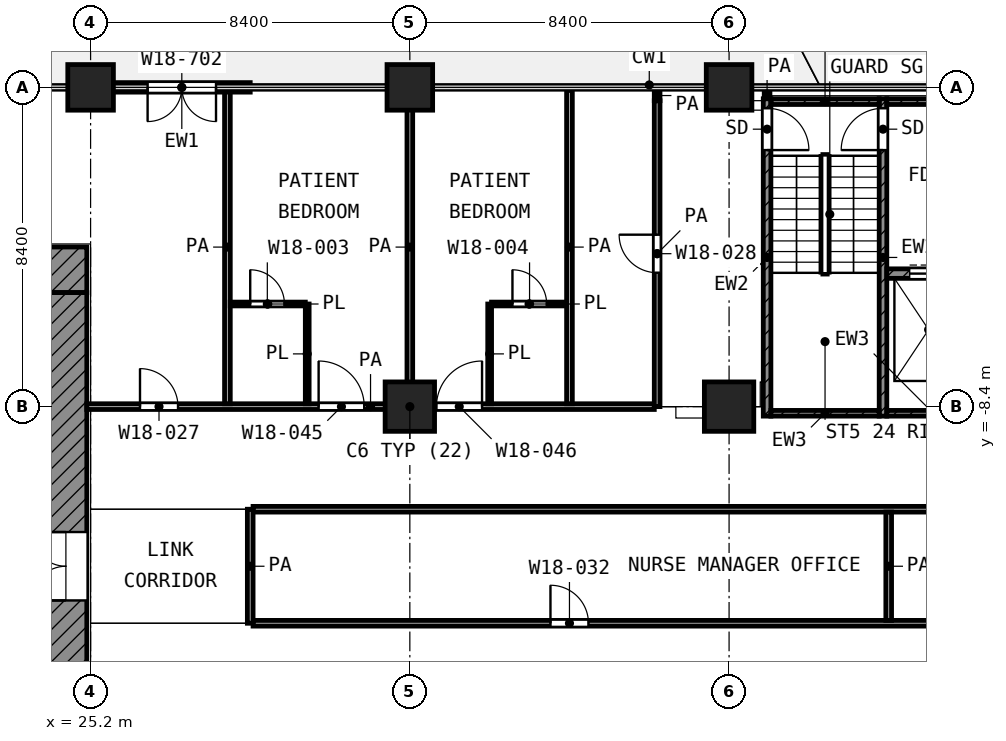
"""IFC4 building model, lengths in metres.
Left out: names, types, materials, properties, quantities, classifications, styles, units other than length and angle.
Written with IfcOpenShell. Run it as: python <this file> out.ifc"""

import sys

from ifc_helpers import new_model, si_unit, direction, frame, frame_2d, origin, origin_2d, place, context, subcontext, project, spatial, rectangle, extrude, element, fill, save


model = new_model("IFC4")
c1 = context("Model", 3, precision=1e-05, world=origin(), true_north=direction((0.0, 1.0)))
c2 = subcontext(c1, "Body", "Model", "MODEL_VIEW")
j1 = project(units=[si_unit("LENGTHUNIT", "METRE"), si_unit("PLANEANGLEUNIT", "RADIAN")], contexts=[c1])
p1 = place(None, origin())
s1 = spatial("IfcSite", under=j1, at=p1, CompositionType="ELEMENT")
p2 = place(p1, origin())
s2 = spatial("IfcBuilding", under=s1, at=p2, CompositionType="ELEMENT")
p3 = place(p2, frame((0.0, 0.0, 81.2)))
s3 = spatial("IfcBuildingStorey", under=s2, at=p3, CompositionType="ELEMENT", Elevation=81.2)
for number, where, z_axis, x_axis in (
    (1, (25.2, 0.0, 0.0), (0.0, 0.0, 1.0), (1.0, 0.0, 0.0)),
    (2, (33.6, 0.0, 0.0), (0.0, 0.0, 1.0), (1.0, 0.0, 0.0)),
    (3, (42.0, 0.0, 0.0), (0.0, 0.0, 1.0), (1.0, 0.0, 0.0)),
):
    element("IfcColumn", number, at=place(p3, frame(where, z_axis=z_axis, x_axis=x_axis)), inside=s3, PredefinedType="COLUMN", context=c2, shape_type="SweptSolid", body=[
        extrude(rectangle(XDim=1.2, YDim=1.2, at=origin_2d()), origin(), (0.0, 0.0, 1.0), 4.2),
    ])
for number, where, z_axis, x_axis in (
    (4, (33.6, -8.4, 0.0), (0.0, 0.0, 1.0), (1.0, 0.0, 0.0)),
    (5, (42.0, -8.4, 0.0), (0.0, 0.0, 1.0), (1.0, 0.0, 0.0)),
):
    element("IfcColumn", number, at=place(p3, frame(where, z_axis=z_axis, x_axis=x_axis)), inside=s3, PredefinedType="COLUMN", context=c2, shape_type="SweptSolid", body=[
        extrude(rectangle(XDim=1.3, YDim=1.3, at=origin_2d()), origin(), (0.0, 0.0, 1.0), 4.2),
    ])
p4 = place(p3, frame((29.4, 0.0, 0.0), z_axis=(0.0, 0.0, 1.0), x_axis=(-1.0, 0.0, 0.0)))
e6 = element("IfcWall", 6, at=p4, inside=s3, PredefinedType="SOLIDWALL", context=c2, shape_type="SweptSolid", body=[
    extrude(rectangle(XDim=3.6, YDim=0.25, at=frame_2d((1.8, 0.0))), origin(), (0.0, 0.0, 1.0), 3.78),
])
p5 = place(p4, frame((0.9, 0.0, 0.0)))
e7 = element("IfcOpeningElement", 7, at=p5, cuts=e6, PredefinedType="OPENING", context=c2, shape_type="SweptSolid", body=[
    extrude(rectangle(XDim=1.8, YDim=2.1, at=frame_2d((0.9, 1.05))), frame((0.0, 0.135, 0.0), z_axis=(0.0, -1.0, 0.0), x_axis=(1.0, 0.0, 0.0)), (0.0, 0.0, 1.0), 0.27),
])
p6 = place(p3, frame((4.2, -4.8, 0.0), z_axis=(0.0, 0.0, 1.0), x_axis=(1.0, 0.0, 0.0)))
e8 = element("IfcWall", 8, at=p6, inside=s3, PredefinedType="SHEAR", context=c2, shape_type="SweptSolid", body=[
    extrude(rectangle(XDim=20.9, YDim=1.2, at=frame_2d((10.45, 0.0))), origin(), (0.0, 0.0, 1.0), 3.9),
])
p7 = place(p6, frame((1.95, 0.0, 0.0)))
e9 = element("IfcOpeningElement", 9, at=p7, cuts=e8, PredefinedType="OPENING", context=c2, shape_type="SweptSolid", body=[
    extrude(rectangle(XDim=1.1, YDim=2.1, at=frame_2d((0.55, 1.05))), frame((0.0, 0.61, 0.0), z_axis=(0.0, -1.0, 0.0), x_axis=(1.0, 0.0, 0.0)), (0.0, 0.0, 1.0), 1.22),
])
p8 = place(p6, frame((17.95, 0.0, 0.0)))
e10 = element("IfcOpeningElement", 10, at=p8, cuts=e8, PredefinedType="OPENING", context=c2, shape_type="SweptSolid", body=[
    extrude(rectangle(XDim=1.1, YDim=2.1, at=frame_2d((0.55, 1.05))), frame((0.0, 0.61, 0.0), z_axis=(0.0, -1.0, 0.0), x_axis=(1.0, 0.0, 0.0)), (0.0, 0.0, 1.0), 1.22),
])
p9 = place(p3, frame((24.55, -24.0, 0.0), z_axis=(0.0, 0.0, 1.0), x_axis=(0.0, 1.0, 0.0)))
e11 = element("IfcWall", 11, at=p9, inside=s3, PredefinedType="SHEAR", context=c2, shape_type="SweptSolid", body=[
    extrude(rectangle(XDim=18.6, YDim=1.1, at=frame_2d((9.3, 0.0))), origin(), (0.0, 0.0, 1.0), 3.9),
])
p10 = place(p9, frame((10.5, 0.0, 0.0)))
e12 = element("IfcOpeningElement", 12, at=p10, cuts=e11, PredefinedType="OPENING", context=c2, shape_type="SweptSolid", body=[
    extrude(rectangle(XDim=1.8, YDim=2.1, at=frame_2d((0.9, 1.05))), frame((0.0, 0.56, 0.0), z_axis=(0.0, -1.0, 0.0), x_axis=(1.0, 0.0, 0.0)), (0.0, 0.0, 1.0), 1.12),
])
p11 = place(p3, frame((43.0, -8.65, 0.0), z_axis=(0.0, 0.0, 1.0), x_axis=(0.0, 1.0, 0.0)))
e13 = element("IfcWall", 13, at=p11, inside=s3, PredefinedType="SHEAR", context=c2, shape_type="SweptSolid", body=[
    extrude(rectangle(XDim=8.35, YDim=0.2, at=frame_2d((4.175, 0.0))), origin(), (0.0, 0.0, 1.0), 3.9),
])
p12 = place(p11, frame((7.0, 0.0, 0.0)))
e14 = element("IfcOpeningElement", 14, at=p12, cuts=e13, PredefinedType="OPENING", context=c2, shape_type="SweptSolid", body=[
    extrude(rectangle(XDim=1.1, YDim=2.1, at=frame_2d((0.55, 1.05))), frame((0.0, 0.11, 0.0), z_axis=(0.0, -1.0, 0.0), x_axis=(1.0, 0.0, 0.0)), (0.0, 0.0, 1.0), 0.22),
])
p13 = place(p3, frame((46.05, -8.65, 0.0), z_axis=(0.0, 0.0, 1.0), x_axis=(0.0, 1.0, 0.0)))
e15 = element("IfcWall", 15, at=p13, inside=s3, PredefinedType="SHEAR", context=c2, shape_type="SweptSolid", body=[
    extrude(rectangle(XDim=8.35, YDim=0.2, at=frame_2d((4.175, 0.0))), origin(), (0.0, 0.0, 1.0), 3.9),
])
p14 = place(p13, frame((7.0, 0.0, 0.0)))
e16 = element("IfcOpeningElement", 16, at=p14, cuts=e15, PredefinedType="OPENING", context=c2, shape_type="SweptSolid", body=[
    extrude(rectangle(XDim=1.1, YDim=2.1, at=frame_2d((0.55, 1.05))), frame((0.0, 0.11, 0.0), z_axis=(0.0, -1.0, 0.0), x_axis=(1.0, 0.0, 0.0)), (0.0, 0.0, 1.0), 0.22),
])
p15 = place(p3, frame((43.1, -0.375, 0.0), z_axis=(0.0, 0.0, 1.0), x_axis=(1.0, 0.0, 0.0)))
e17 = element("IfcWall", 17, at=p15, inside=s3, PredefinedType="SHEAR", context=c2, shape_type="SweptSolid", body=[
    extrude(rectangle(XDim=2.85, YDim=0.15, at=frame_2d((1.425, 0.0))), origin(), (0.0, 0.0, 1.0), 3.9),
])
p16 = place(p3, frame((46.15, -0.375, 0.0), z_axis=(0.0, 0.0, 1.0), x_axis=(1.0, 0.0, 0.0)))
e18 = element("IfcWall", 18, at=p16, inside=s3, PredefinedType="SHEAR", context=c2, shape_type="SweptSolid", body=[
    extrude(rectangle(XDim=2.45, YDim=0.15, at=frame_2d((1.225, 0.0))), origin(), (0.0, 0.0, 1.0), 3.9),
])
p17 = place(p3, frame((43.1, -8.575, 0.0), z_axis=(0.0, 0.0, 1.0), x_axis=(1.0, 0.0, 0.0)))
e19 = element("IfcWall", 19, at=p17, inside=s3, PredefinedType="SHEAR", context=c2, shape_type="SweptSolid", body=[
    extrude(rectangle(XDim=2.85, YDim=0.15, at=frame_2d((1.425, 0.0))), origin(), (0.0, 0.0, 1.0), 3.9),
])
p18 = place(p3, frame((46.15, -8.575, 0.0), z_axis=(0.0, 0.0, 1.0), x_axis=(1.0, 0.0, 0.0)))
e20 = element("IfcWall", 20, at=p18, inside=s3, PredefinedType="SHEAR", context=c2, shape_type="SweptSolid", body=[
    extrude(rectangle(XDim=2.45, YDim=0.15, at=frame_2d((1.225, 0.0))), origin(), (0.0, 0.0, 1.0), 3.9),
])
p19 = place(p3, frame((46.15, -4.9, 0.0), z_axis=(0.0, 0.0, 1.0), x_axis=(1.0, 0.0, 0.0)))
e21 = element("IfcWall", 21, at=p19, inside=s3, PredefinedType="SHEAR", context=c2, shape_type="SweptSolid", body=[
    extrude(rectangle(XDim=2.45, YDim=0.25, at=frame_2d((1.225, 0.0))), origin(), (0.0, 0.0, 1.0), 3.9),
])
p20 = place(p19, frame((0.6, 0.0, 0.0)))
e22 = element("IfcOpeningElement", 22, at=p20, cuts=e21, PredefinedType="OPENING", context=c2, shape_type="SweptSolid", body=[
    extrude(rectangle(XDim=1.3, YDim=2.1, at=frame_2d((0.65, 1.05))), frame((0.0, 0.135, 0.0), z_axis=(0.0, -1.0, 0.0), x_axis=(1.0, 0.0, 0.0)), (0.0, 0.0, 1.0), 0.27),
])
p21 = place(p3, frame((28.875, -5.7, 0.0), z_axis=(0.0, 0.0, 1.0), x_axis=(1.0, 0.0, 0.0)))
e23 = element("IfcWall", 23, at=p21, inside=s3, PredefinedType="PARTITIONING", context=c2, shape_type="SweptSolid", body=[
    extrude(rectangle(XDim=1.975, YDim=0.1, at=frame_2d((0.988, 0.0))), origin(), (0.0, 0.0, 1.0), 3.9),
])
p22 = place(p21, frame((0.525, 0.0, 0.0)))
e24 = element("IfcOpeningElement", 24, at=p22, cuts=e23, PredefinedType="OPENING", context=c2, shape_type="SweptSolid", body=[
    extrude(rectangle(XDim=0.9, YDim=2.1, at=frame_2d((0.45, 1.05))), frame((0.0, 0.06, 0.0), z_axis=(0.0, -1.0, 0.0), x_axis=(1.0, 0.0, 0.0)), (0.0, 0.0, 1.0), 0.12),
])
p23 = place(p3, frame((35.75, -5.7, 0.0), z_axis=(0.0, 0.0, 1.0), x_axis=(1.0, 0.0, 0.0)))
e25 = element("IfcWall", 25, at=p23, inside=s3, PredefinedType="PARTITIONING", context=c2, shape_type="SweptSolid", body=[
    extrude(rectangle(XDim=1.975, YDim=0.1, at=frame_2d((0.988, 0.0))), origin(), (0.0, 0.0, 1.0), 3.9),
])
p24 = place(p23, frame((0.55, 0.0, 0.0)))
e26 = element("IfcOpeningElement", 26, at=p24, cuts=e25, PredefinedType="OPENING", context=c2, shape_type="SweptSolid", body=[
    extrude(rectangle(XDim=0.9, YDim=2.1, at=frame_2d((0.45, 1.05))), frame((0.0, 0.06, 0.0), z_axis=(0.0, -1.0, 0.0), x_axis=(1.0, 0.0, 0.0)), (0.0, 0.0, 1.0), 0.12),
])
for number, where, z_axis, x_axis in (
    (27, (30.9, -8.325, 0.0), (0.0, 0.0, 1.0), (0.0, 1.0, 0.0)),
    (28, (35.7, -8.325, 0.0), (0.0, 0.0, 1.0), (0.0, 1.0, 0.0)),
):
    element("IfcWall", number, at=place(p3, frame(where, z_axis=z_axis, x_axis=x_axis)), inside=s3, PredefinedType="PARTITIONING", context=c2, shape_type="SweptSolid", body=[
        extrude(rectangle(XDim=2.625, YDim=0.1, at=frame_2d((1.312, 0.0))), origin(), (0.0, 0.0, 1.0), 3.9),
    ])
p25 = place(p3, frame((29.475, -14.1, 0.0), z_axis=(0.0, 0.0, 1.0), x_axis=(1.0, 0.0, 0.0)))
e29 = element("IfcWall", 29, at=p25, inside=s3, PredefinedType="PARTITIONING", context=c2, shape_type="SweptSolid", body=[
    extrude(rectangle(XDim=47.55, YDim=0.15, at=frame_2d((23.775, 0.0))), origin(), (0.0, 0.0, 1.0), 3.9),
])
p26 = place(p25, frame((7.825, 0.0, 0.0)))
e30 = element("IfcOpeningElement", 30, at=p26, cuts=e29, PredefinedType="OPENING", context=c2, shape_type="SweptSolid", body=[
    extrude(rectangle(XDim=1.0, YDim=2.1, at=frame_2d((0.5, 1.05))), frame((0.0, 0.085, 0.0), z_axis=(0.0, -1.0, 0.0), x_axis=(1.0, 0.0, 0.0)), (0.0, 0.0, 1.0), 0.17),
])
p27 = place(p25, frame((22.425, 0.0, 0.0)))
e31 = element("IfcOpeningElement", 31, at=p27, cuts=e29, PredefinedType="OPENING", context=c2, shape_type="SweptSolid", body=[
    extrude(rectangle(XDim=1.2, YDim=2.1, at=frame_2d((0.6, 1.05))), frame((0.0, 0.085, 0.0), z_axis=(0.0, -1.0, 0.0), x_axis=(1.0, 0.0, 0.0)), (0.0, 0.0, 1.0), 0.17),
])
p28 = place(p25, frame((37.975, 0.0, 0.0)))
e32 = element("IfcOpeningElement", 32, at=p28, cuts=e29, PredefinedType="OPENING", context=c2, shape_type="SweptSolid", body=[
    extrude(rectangle(XDim=1.0, YDim=2.1, at=frame_2d((0.5, 1.05))), frame((0.0, 0.085, 0.0), z_axis=(0.0, -1.0, 0.0), x_axis=(1.0, 0.0, 0.0)), (0.0, 0.0, 1.0), 0.17),
])
p29 = place(p3, frame((29.475, -11.1, 0.0), z_axis=(0.0, 0.0, 1.0), x_axis=(1.0, 0.0, 0.0)))
e33 = element("IfcWall", 33, at=p29, inside=s3, PredefinedType="PARTITIONING", context=c2, shape_type="SweptSolid", body=[
    extrude(rectangle(XDim=47.55, YDim=0.15, at=frame_2d((23.775, 0.0))), origin(), (0.0, 0.0, 1.0), 3.9),
])
p30 = place(p3, frame((25.1, -8.4, 0.0), z_axis=(0.0, 0.0, 1.0), x_axis=(1.0, 0.0, 0.0)))
e34 = element("IfcWall", 34, at=p30, inside=s3, PredefinedType="PARTITIONING", context=c2, shape_type="SweptSolid", body=[
    extrude(rectangle(XDim=14.932, YDim=0.15, at=frame_2d((7.466, 0.0))), origin(), (0.0, 0.0, 1.0), 3.9),
])
p31 = place(p30, frame((1.4, 0.0, 0.0)))
e35 = element("IfcOpeningElement", 35, at=p31, cuts=e34, PredefinedType="OPENING", context=c2, shape_type="SweptSolid", body=[
    extrude(rectangle(XDim=1.0, YDim=2.1, at=frame_2d((0.5, 1.05))), frame((0.0, 0.085, 0.0), z_axis=(0.0, -1.0, 0.0), x_axis=(1.0, 0.0, 0.0)), (0.0, 0.0, 1.0), 0.17),
])
p32 = place(p30, frame((6.1, 0.0, 0.0)))
e36 = element("IfcOpeningElement", 36, at=p32, cuts=e34, PredefinedType="OPENING", context=c2, shape_type="SweptSolid", body=[
    extrude(rectangle(XDim=1.2, YDim=2.1, at=frame_2d((0.6, 1.05))), frame((0.0, 0.085, 0.0), z_axis=(0.0, -1.0, 0.0), x_axis=(1.0, 0.0, 0.0)), (0.0, 0.0, 1.0), 0.17),
])
p33 = place(p30, frame((9.2, 0.0, 0.0)))
e37 = element("IfcOpeningElement", 37, at=p33, cuts=e34, PredefinedType="OPENING", context=c2, shape_type="SweptSolid", body=[
    extrude(rectangle(XDim=1.2, YDim=2.1, at=frame_2d((0.6, 1.05))), frame((0.0, 0.085, 0.0), z_axis=(0.0, -1.0, 0.0), x_axis=(1.0, 0.0, 0.0)), (0.0, 0.0, 1.0), 0.17),
])
p34 = place(p3, frame((28.8, -8.325, 0.0), z_axis=(0.0, 0.0, 1.0), x_axis=(0.0, 1.0, 0.0)))
e38 = element("IfcWall", 38, at=p34, inside=s3, PredefinedType="PARTITIONING", context=c2, shape_type="SweptSolid", body=[
    extrude(rectangle(XDim=8.245, YDim=0.15, at=frame_2d((4.123, 0.0))), origin(), (0.0, 0.0, 1.0), 3.9),
])
p35 = place(p3, frame((29.4, -14.1, 0.0), z_axis=(0.0, 0.0, 1.0), x_axis=(0.0, 1.0, 0.0)))
e39 = element("IfcWall", 39, at=p35, inside=s3, PredefinedType="PARTITIONING", context=c2, shape_type="SweptSolid", body=[
    extrude(rectangle(XDim=3.0, YDim=0.15, at=frame_2d((1.5, 0.0))), origin(), (0.0, 0.0, 1.0), 3.9),
])
for number, where, z_axis, x_axis in (
    (40, (33.6, -8.325, 0.0), (0.0, 0.0, 1.0), (0.0, 1.0, 0.0)),
    (41, (37.8, -8.325, 0.0), (0.0, 0.0, 1.0), (0.0, 1.0, 0.0)),
):
    element("IfcWall", number, at=place(p3, frame(where, z_axis=z_axis, x_axis=x_axis)), inside=s3, PredefinedType="PARTITIONING", context=c2, shape_type="SweptSolid", body=[
        extrude(rectangle(XDim=8.245, YDim=0.15, at=frame_2d((4.123, 0.0))), origin(), (0.0, 0.0, 1.0), 3.9),
    ])
p36 = place(p3, frame((40.107, -8.4, 0.0), z_axis=(0.0, 0.0, 1.0), x_axis=(0.0, 1.0, 0.0)))
e42 = element("IfcWall", 42, at=p36, inside=s3, PredefinedType="PARTITIONING", context=c2, shape_type="SweptSolid", body=[
    extrude(rectangle(XDim=8.048, YDim=0.15, at=frame_2d((4.024, 0.0))), origin(), (0.0, 0.0, 1.0), 3.9),
])
p37 = place(p36, frame((3.524, 0.0, 0.0)))
e43 = element("IfcOpeningElement", 43, at=p37, cuts=e42, PredefinedType="OPENING", context=c2, shape_type="SweptSolid", body=[
    extrude(rectangle(XDim=1.0, YDim=2.1, at=frame_2d((0.5, 1.05))), frame((0.0, 0.085, 0.0), z_axis=(0.0, -1.0, 0.0), x_axis=(1.0, 0.0, 0.0)), (0.0, 0.0, 1.0), 0.17),
])
p38 = place(p3, frame((40.107, -0.35, 0.0), z_axis=(0.0, 0.0, 1.0), x_axis=(0.0, 1.0, 0.0)))
e44 = element("IfcWall", 44, at=p38, inside=s3, PredefinedType="PARTITIONING", context=c2, shape_type="SweptSolid", body=[
    extrude(rectangle(XDim=0.27, YDim=0.15, at=frame_2d((0.135, 0.0))), origin(), (0.0, 0.0, 1.0), 3.9),
])
p39 = place(p3, frame((43.0, -0.27, 0.0), z_axis=(0.0, 0.0, 1.0), x_axis=(0.0, 1.0, 0.0)))
e45 = element("IfcWall", 45, at=p39, inside=s3, PredefinedType="PARTITIONING", context=c2, shape_type="SweptSolid", body=[
    extrude(rectangle(XDim=0.19, YDim=0.15, at=frame_2d((0.095, 0.0))), origin(), (0.0, 0.0, 1.0), 3.9),
])
p40 = place(p3, frame((46.2, -14.025, 0.0), z_axis=(0.0, 0.0, 1.0), x_axis=(0.0, 1.0, 0.0)))
e46 = element("IfcWall", 46, at=p40, inside=s3, PredefinedType="PARTITIONING", context=c2, shape_type="SweptSolid", body=[
    extrude(rectangle(XDim=2.85, YDim=0.15, at=frame_2d((1.425, 0.0))), origin(), (0.0, 0.0, 1.0), 3.9),
])
p41 = place(p5, origin())
e47 = element("IfcDoor", 47, at=p41, inside=s3, OperationType="DOUBLE_DOOR_SINGLE_SWING", PredefinedType="DOOR", context=c2, shape_type="SweptSolid", body=[
    extrude(rectangle(XDim=1.8, YDim=2.1, at=frame_2d((0.9, 1.05))), frame((0.0, 0.025, 0.0), z_axis=(0.0, -1.0, 0.0), x_axis=(1.0, 0.0, 0.0)), (0.0, 0.0, 1.0), 0.05),
])
fill(e7, e47)
p42 = place(p10, origin())
e48 = element("IfcDoor", 48, at=p42, inside=s3, OperationType="DOUBLE_DOOR_SINGLE_SWING", PredefinedType="DOOR", context=c2, shape_type="SweptSolid", body=[
    extrude(rectangle(XDim=1.8, YDim=2.1, at=frame_2d((0.9, 1.05))), frame((0.0, 0.025, 0.0), z_axis=(0.0, -1.0, 0.0), x_axis=(1.0, 0.0, 0.0)), (0.0, 0.0, 1.0), 0.05),
])
fill(e12, e48)
p43 = place(p12, frame((1.1, 0.0, 0.0), z_axis=(0.0, 0.0, 1.0), x_axis=(-1.0, 0.0, 0.0)))
e49 = element("IfcDoor", 49, at=p43, inside=s3, OperationType="SINGLE_SWING_LEFT", PredefinedType="DOOR", context=c2, shape_type="SweptSolid", body=[
    extrude(rectangle(XDim=1.1, YDim=2.1, at=frame_2d((0.55, 1.05))), frame((0.0, 0.025, 0.0), z_axis=(0.0, -1.0, 0.0), x_axis=(1.0, 0.0, 0.0)), (0.0, 0.0, 1.0), 0.05),
])
fill(e14, e49)
p44 = place(p14, origin())
e50 = element("IfcDoor", 50, at=p44, inside=s3, OperationType="SINGLE_SWING_LEFT", PredefinedType="DOOR", context=c2, shape_type="SweptSolid", body=[
    extrude(rectangle(XDim=1.1, YDim=2.1, at=frame_2d((0.55, 1.05))), frame((0.0, 0.025, 0.0), z_axis=(0.0, -1.0, 0.0), x_axis=(1.0, 0.0, 0.0)), (0.0, 0.0, 1.0), 0.05),
])
fill(e16, e50)
p45 = place(p20, origin())
e51 = element("IfcDoor", 51, at=p45, inside=s3, OperationType="DOUBLE_DOOR_SLIDING", PredefinedType="DOOR", context=c2, shape_type="SweptSolid", body=[
    extrude(rectangle(XDim=1.3, YDim=2.1, at=frame_2d((0.65, 1.05))), frame((0.0, 0.025, 0.0), z_axis=(0.0, -1.0, 0.0), x_axis=(1.0, 0.0, 0.0)), (0.0, 0.0, 1.0), 0.05),
])
fill(e22, e51)
p46 = place(p31, origin())
e52 = element("IfcDoor", 52, at=p46, inside=s3, OperationType="SINGLE_SWING_LEFT", PredefinedType="DOOR", context=c2, shape_type="SweptSolid", body=[
    extrude(rectangle(XDim=1.0, YDim=2.1, at=frame_2d((0.5, 1.05))), frame((0.0, 0.025, 0.0), z_axis=(0.0, -1.0, 0.0), x_axis=(1.0, 0.0, 0.0)), (0.0, 0.0, 1.0), 0.05),
])
fill(e35, e52)
p47 = place(p32, origin())
e53 = element("IfcDoor", 53, at=p47, inside=s3, OperationType="SINGLE_SWING_LEFT", PredefinedType="DOOR", context=c2, shape_type="SweptSolid", body=[
    extrude(rectangle(XDim=1.2, YDim=2.1, at=frame_2d((0.6, 1.05))), frame((0.0, 0.025, 0.0), z_axis=(0.0, -1.0, 0.0), x_axis=(1.0, 0.0, 0.0)), (0.0, 0.0, 1.0), 0.05),
])
fill(e36, e53)
p48 = place(p22, origin())
e54 = element("IfcDoor", 54, at=p48, inside=s3, OperationType="SINGLE_SWING_LEFT", PredefinedType="DOOR", context=c2, shape_type="SweptSolid", body=[
    extrude(rectangle(XDim=0.9, YDim=2.1, at=frame_2d((0.45, 1.05))), frame((0.0, 0.025, 0.0), z_axis=(0.0, -1.0, 0.0), x_axis=(1.0, 0.0, 0.0)), (0.0, 0.0, 1.0), 0.05),
])
fill(e24, e54)
p49 = place(p33, origin())
e55 = element("IfcDoor", 55, at=p49, inside=s3, OperationType="SINGLE_SWING_RIGHT", PredefinedType="DOOR", context=c2, shape_type="SweptSolid", body=[
    extrude(rectangle(XDim=1.2, YDim=2.1, at=frame_2d((0.6, 1.05))), frame((0.0, 0.025, 0.0), z_axis=(0.0, -1.0, 0.0), x_axis=(1.0, 0.0, 0.0)), (0.0, 0.0, 1.0), 0.05),
])
fill(e37, e55)
p50 = place(p24, origin())
e56 = element("IfcDoor", 56, at=p50, inside=s3, OperationType="SINGLE_SWING_LEFT", PredefinedType="DOOR", context=c2, shape_type="SweptSolid", body=[
    extrude(rectangle(XDim=0.9, YDim=2.1, at=frame_2d((0.45, 1.05))), frame((0.0, 0.025, 0.0), z_axis=(0.0, -1.0, 0.0), x_axis=(1.0, 0.0, 0.0)), (0.0, 0.0, 1.0), 0.05),
])
fill(e26, e56)
p51 = place(p37, origin())
e57 = element("IfcDoor", 57, at=p51, inside=s3, OperationType="SINGLE_SWING_RIGHT", PredefinedType="DOOR", context=c2, shape_type="SweptSolid", body=[
    extrude(rectangle(XDim=1.0, YDim=2.1, at=frame_2d((0.5, 1.05))), frame((0.0, 0.025, 0.0), z_axis=(0.0, -1.0, 0.0), x_axis=(1.0, 0.0, 0.0)), (0.0, 0.0, 1.0), 0.05),
])
fill(e43, e57)
p52 = place(p26, origin())
e58 = element("IfcDoor", 58, at=p52, inside=s3, OperationType="SINGLE_SWING_LEFT", PredefinedType="DOOR", context=c2, shape_type="SweptSolid", body=[
    extrude(rectangle(XDim=1.0, YDim=2.1, at=frame_2d((0.5, 1.05))), frame((0.0, 0.025, 0.0), z_axis=(0.0, -1.0, 0.0), x_axis=(1.0, 0.0, 0.0)), (0.0, 0.0, 1.0), 0.05),
])
fill(e30, e58)
save(model, sys.argv[1])
